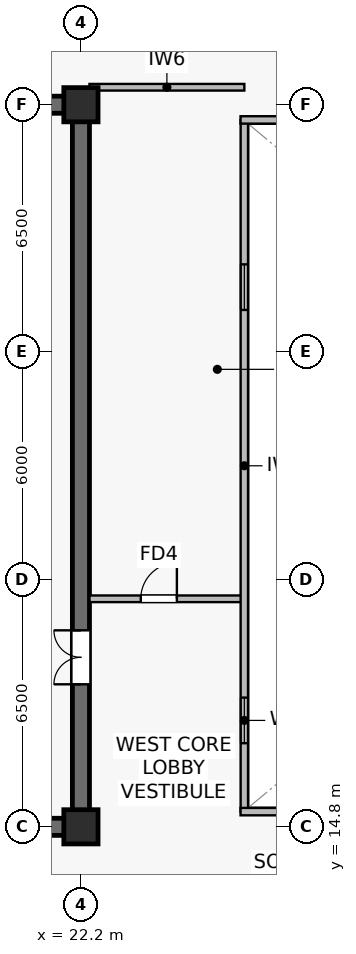
"""IFC4 building model, lengths in metres.
Left out: names, types, materials, properties, quantities, classifications, styles, units other than length and angle.
Written with IfcOpenShell. Run it as: python <this file> out.ifc"""

import sys

from ifc_helpers import new_model, si_unit, direction, frame, frame_2d, origin, origin_2d, place, context, subcontext, project, spatial, rectangle, extrude, source, transform, mapped, element, fill, save


model = new_model("IFC4")
c1 = context("Model", 3, precision=1e-05, world=origin(), true_north=direction((0.0, 1.0)))
c2 = subcontext(c1, "Body", "Model", "MODEL_VIEW")
j1 = project(units=[si_unit("LENGTHUNIT", "METRE"), si_unit("PLANEANGLEUNIT", "RADIAN")], contexts=[c1])
p1 = place(None, origin())
s1 = spatial("IfcSite", under=j1, at=p1, CompositionType="ELEMENT")
p2 = place(p1, origin())
s2 = spatial("IfcBuilding", under=s1, at=p2, CompositionType="ELEMENT")
p3 = place(p2, frame((0.0, 0.0, 297.6)))
s3 = spatial("IfcBuildingStorey", under=s2, at=p3, CompositionType="ELEMENT", Elevation=297.6)
p4 = place(p3, frame((7.175, 14.8, 0.0), z_axis=(0.0, 0.0, 1.0), x_axis=(1.0, 0.0, 0.0)))
e1 = element("IfcWall", 1, at=p4, inside=s3, PredefinedType="SHEAR", context=c2, shape_type="SweptSolid", body=[
    extrude(rectangle(XDim=15.25, YDim=0.45, at=frame_2d((7.625, 0.0))), origin(), (0.0, 0.0, 1.0), 3.9),
])
p5 = place(p3, frame((7.175, 33.8, 0.0), z_axis=(0.0, 0.0, 1.0), x_axis=(1.0, 0.0, 0.0)))
e2 = element("IfcWall", 2, at=p5, inside=s3, PredefinedType="SHEAR", context=c2, shape_type="SweptSolid", body=[
    extrude(rectangle(XDim=15.25, YDim=0.45, at=frame_2d((7.625, 0.0))), origin(), (0.0, 0.0, 1.0), 3.9),
])
p6 = place(p5, frame((5.15, 0.0, 0.0)))
e3 = element("IfcOpeningElement", 3, at=p6, cuts=e2, PredefinedType="OPENING", context=c2, shape_type="SweptSolid", body=[
    extrude(rectangle(XDim=0.95, YDim=2.15, at=frame_2d((0.475, 1.075))), frame((0.0, 0.235, 0.0), z_axis=(0.0, -1.0, 0.0), x_axis=(1.0, 0.0, 0.0)), (0.0, 0.0, 1.0), 0.47),
])
p7 = place(p5, frame((7.665, 0.0, 0.0)))
e4 = element("IfcOpeningElement", 4, at=p7, cuts=e2, PredefinedType="OPENING", context=c2, shape_type="SweptSolid", body=[
    extrude(rectangle(XDim=0.95, YDim=2.15, at=frame_2d((0.475, 1.075))), frame((0.0, 0.235, 0.0), z_axis=(0.0, -1.0, 0.0), x_axis=(1.0, 0.0, 0.0)), (0.0, 0.0, 1.0), 0.47),
])
p8 = place(p5, frame((10.215, 0.0, 0.0)))
e5 = element("IfcOpeningElement", 5, at=p8, cuts=e2, PredefinedType="OPENING", context=c2, shape_type="SweptSolid", body=[
    extrude(rectangle(XDim=0.95, YDim=2.15, at=frame_2d((0.475, 1.075))), frame((0.0, 0.235, 0.0), z_axis=(0.0, -1.0, 0.0), x_axis=(1.0, 0.0, 0.0)), (0.0, 0.0, 1.0), 0.47),
])
p9 = place(p5, frame((12.765, 0.0, 0.0)))
e6 = element("IfcOpeningElement", 6, at=p9, cuts=e2, PredefinedType="OPENING", context=c2, shape_type="SweptSolid", body=[
    extrude(rectangle(XDim=0.95, YDim=2.15, at=frame_2d((0.475, 1.075))), frame((0.0, 0.235, 0.0), z_axis=(0.0, -1.0, 0.0), x_axis=(1.0, 0.0, 0.0)), (0.0, 0.0, 1.0), 0.47),
])
p10 = place(p3, frame((22.2, 15.025, 0.0), z_axis=(0.0, 0.0, 1.0), x_axis=(0.0, 1.0, 0.0)))
e7 = element("IfcWall", 7, at=p10, inside=s3, PredefinedType="SHEAR", context=c2, shape_type="SweptSolid", body=[
    extrude(rectangle(XDim=18.55, YDim=0.45, at=frame_2d((9.275, 0.0))), origin(), (0.0, 0.0, 1.0), 3.9),
])
p11 = place(p10, frame((3.525, 0.0, 0.0)))
e8 = element("IfcOpeningElement", 8, at=p11, cuts=e7, PredefinedType="OPENING", context=c2, shape_type="SweptSolid", body=[
    extrude(rectangle(XDim=1.42, YDim=2.2, at=frame_2d((0.71, 1.1))), frame((0.0, 0.235, 0.0), z_axis=(0.0, -1.0, 0.0), x_axis=(1.0, 0.0, 0.0)), (0.0, 0.0, 1.0), 0.47),
])
m1 = source(origin(), c2, "Body", "SweptSolid", [
    extrude(rectangle(XDim=0.9, YDim=0.9, at=origin_2d()), origin(), (0.0, 0.0, 1.0), 4.2),
])
for number, where, z_axis, x_axis in (
    (9, (22.2, 14.8, 0.0), (0.0, 0.0, 1.0), (1.0, 0.0, 0.0)),
    (10, (22.2, 33.8, 0.0), (0.0, 0.0, 1.0), (1.0, 0.0, 0.0)),
):
    element("IfcColumn", number, at=place(p3, frame(where, z_axis=z_axis, x_axis=x_axis)), inside=s3, PredefinedType="COLUMN", context=c2, shape_type="MappedRepresentation", body=[
        mapped(m1, transform((0.0, 0.0, 0.0), scale=1.0)),
    ])
p12 = place(p3, frame((22.425, 34.26, 0.0), z_axis=(0.0, 0.0, 1.0), x_axis=(1.0, 0.0, 0.0)))
e11 = element("IfcWall", 11, at=p12, inside=s3, PredefinedType="PARTITIONING", context=c2, shape_type="SweptSolid", body=[
    extrude(rectangle(XDim=4.075, YDim=0.175, at=frame_2d((2.038, 0.0))), origin(), (0.0, 0.0, 1.0), 3.635),
])
p13 = place(p3, frame((22.425, 20.8, 0.0), z_axis=(0.0, 0.0, 1.0), x_axis=(1.0, 0.0, 0.0)))
e12 = element("IfcWall", 12, at=p13, inside=s3, PredefinedType="PARTITIONING", context=c2, shape_type="SweptSolid", body=[
    extrude(rectangle(XDim=4.075, YDim=0.175, at=frame_2d((2.038, 0.0))), origin(), (0.0, 0.0, 1.0), 3.9),
])
p14 = place(p13, frame((1.35, 0.0, 0.0)))
e13 = element("IfcOpeningElement", 13, at=p14, cuts=e12, PredefinedType="OPENING", context=c2, shape_type="SweptSolid", body=[
    extrude(rectangle(XDim=0.95, YDim=2.15, at=frame_2d((0.475, 1.075))), frame((0.0, 0.098, 0.0), z_axis=(0.0, -1.0, 0.0), x_axis=(1.0, 0.0, 0.0)), (0.0, 0.0, 1.0), 0.195),
])
p15 = place(p3, frame((26.5, 15.2, 0.0), z_axis=(0.0, 0.0, 1.0), x_axis=(0.0, 1.0, 0.0)))
e14 = element("IfcWall", 14, at=p15, inside=s3, PredefinedType="SOLIDWALL", context=c2, shape_type="SweptSolid", body=[
    extrude(rectangle(XDim=18.2, YDim=0.195, at=frame_2d((9.1, 0.0))), origin(), (0.0, 0.0, 1.0), 3.9),
])
p16 = place(p15, frame((1.8, 0.0, 0.9)))
e15 = element("IfcOpeningElement", 15, at=p16, cuts=e14, PredefinedType="OPENING", context=c2, shape_type="SweptSolid", body=[
    extrude(rectangle(XDim=1.2, YDim=1.35, at=frame_2d((0.6, 0.675))), frame((0.0, 0.107, 0.0), z_axis=(0.0, -1.0, 0.0), x_axis=(1.0, 0.0, 0.0)), (0.0, 0.0, 1.0), 0.215),
])
p17 = place(p15, frame((13.2, 0.0, 0.9)))
e16 = element("IfcOpeningElement", 16, at=p17, cuts=e14, PredefinedType="OPENING", context=c2, shape_type="SweptSolid", body=[
    extrude(rectangle(XDim=1.2, YDim=1.35, at=frame_2d((0.6, 0.675))), frame((0.0, 0.107, 0.0), z_axis=(0.0, -1.0, 0.0), x_axis=(1.0, 0.0, 0.0)), (0.0, 0.0, 1.0), 0.215),
])
for number, where, z_axis, x_axis in (
    (17, (26.4, 15.2, 0.0), (0.0, 0.0, 1.0), (1.0, 0.0, 0.0)),
    (18, (26.4, 33.4, 0.0), (0.0, 0.0, 1.0), (1.0, 0.0, 0.0)),
):
    element("IfcWall", number, at=place(p3, frame(where, z_axis=z_axis, x_axis=x_axis)), inside=s3, PredefinedType="SOLIDWALL", context=c2, shape_type="SweptSolid", body=[
        extrude(rectangle(XDim=22.0, YDim=0.195, at=frame_2d((11.0, 0.0))), origin(), (0.0, 0.0, 1.0), 3.9),
    ])
m2 = source(origin(), c2, "Body", "SweptSolid", [
    extrude(rectangle(XDim=1.2, YDim=1.35, at=frame_2d((0.6, 0.675))), frame((0.0, 0.03, 0.0), z_axis=(0.0, -1.0, 0.0), x_axis=(1.0, 0.0, 0.0)), (0.0, 0.0, 1.0), 0.06),
])
p18 = place(p16, origin())
e19 = element("IfcWindow", 19, at=p18, inside=s3, PartitioningType="SINGLE_PANEL", PredefinedType="WINDOW", context=c2, shape_type="MappedRepresentation", body=[
    mapped(m2, transform((0.0, 0.0, 0.0), scale=1.0)),
])
fill(e15, e19)
p19 = place(p17, origin())
e20 = element("IfcWindow", 20, at=p19, inside=s3, PartitioningType="SINGLE_PANEL", PredefinedType="WINDOW", context=c2, shape_type="MappedRepresentation", body=[
    mapped(m2, transform((0.0, 0.0, 0.0), scale=1.0)),
])
fill(e16, e20)
m3 = source(origin(), c2, "Body", "SweptSolid", [
    extrude(rectangle(XDim=1.42, YDim=2.2, at=frame_2d((0.71, 1.1))), frame((0.0, 0.025, 0.0), z_axis=(0.0, -1.0, 0.0), x_axis=(1.0, 0.0, 0.0)), (0.0, 0.0, 1.0), 0.05),
])
p20 = place(p11, origin())
e21 = element("IfcDoor", 21, at=p20, inside=s3, OperationType="DOUBLE_DOOR_SINGLE_SWING", PredefinedType="DOOR", context=c2, shape_type="MappedRepresentation", body=[
    mapped(m3, transform((0.0, 0.0, 0.0), scale=1.0)),
])
fill(e8, e21)
m4 = source(origin(), c2, "Body", "SweptSolid", [
    extrude(rectangle(XDim=0.95, YDim=2.15, at=frame_2d((0.475, 1.075))), frame((0.0, 0.025, 0.0), z_axis=(0.0, -1.0, 0.0), x_axis=(1.0, 0.0, 0.0)), (0.0, 0.0, 1.0), 0.05),
])
p21 = place(p14, origin())
e22 = element("IfcDoor", 22, at=p21, inside=s3, OperationType="SINGLE_SWING_RIGHT", PredefinedType="DOOR", context=c2, shape_type="MappedRepresentation", body=[
    mapped(m4, transform((0.0, 0.0, 0.0), scale=1.0)),
])
fill(e13, e22)
save(model, sys.argv[1])
